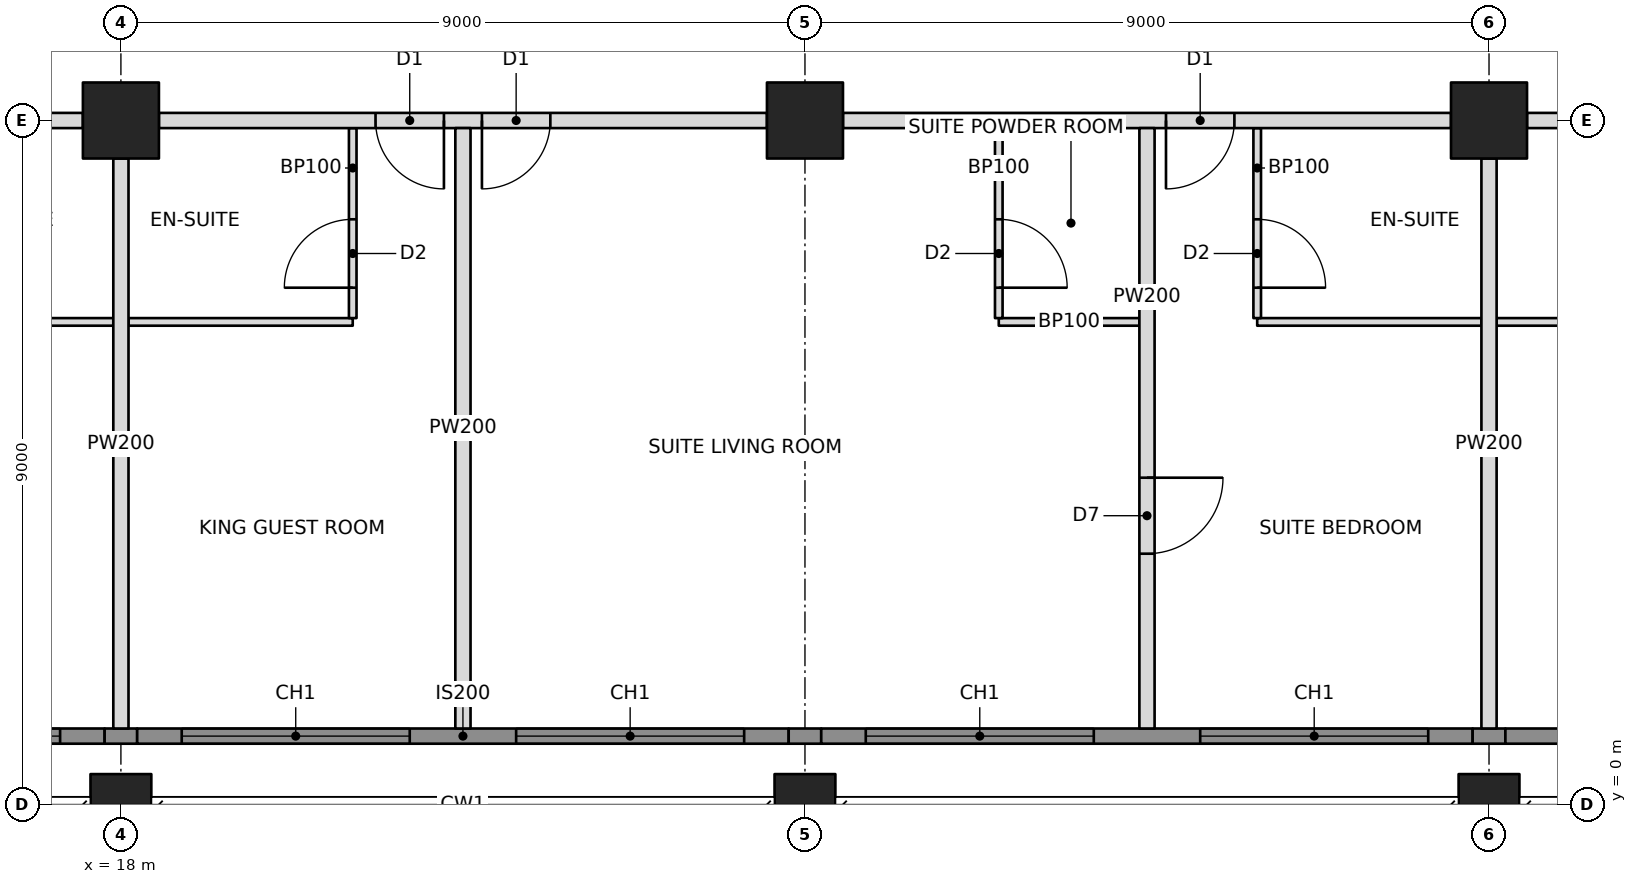
"""IFC4 building model, lengths in metres.
Left out: names, types, materials, properties, quantities, classifications, styles, units other than length and angle.
Written with IfcOpenShell. Run it as: python <this file> out.ifc"""

import sys

from ifc_helpers import new_model, si_unit, direction, frame, frame_2d, origin, origin_2d, place, context, subcontext, project, spatial, rectangle, hollow_rectangle, extrude, element, fill, save


model = new_model("IFC4")
c1 = context("Model", 3, precision=1e-05, world=origin(), true_north=direction((0.0, 1.0)))
c2 = subcontext(c1, "Body", "Model", "MODEL_VIEW")
j1 = project(units=[si_unit("LENGTHUNIT", "METRE"), si_unit("PLANEANGLEUNIT", "RADIAN")], contexts=[c1])
p1 = place(None, origin())
s1 = spatial("IfcSite", under=j1, at=p1, CompositionType="ELEMENT")
p2 = place(p1, origin())
s2 = spatial("IfcBuilding", under=s1, at=p2, CompositionType="ELEMENT")
p3 = place(p2, frame((0.0, 0.0, 152.0)))
s3 = spatial("IfcBuildingStorey", under=s2, at=p3, CompositionType="ELEMENT", Elevation=152.0)
p4 = place(p3, frame((18.0, 0.0, 0.0), z_axis=(0.0, 0.0, 1.0), x_axis=(1.0, 0.0, 0.0)))
e1 = element("IfcColumn", 1, at=p4, inside=s3, PredefinedType="COLUMN", context=c2, shape_type="SweptSolid", body=[
    extrude(hollow_rectangle(XDim=0.8, YDim=0.8, WallThickness=0.06, at=origin_2d()), origin(), (0.0, 0.0, 1.0), 3.4),
])
p5 = place(p3, frame((18.0, 9.0, 0.0), z_axis=(0.0, 0.0, 1.0), x_axis=(1.0, 0.0, 0.0)))
e2 = element("IfcColumn", 2, at=p5, inside=s3, PredefinedType="COLUMN", context=c2, shape_type="SweptSolid", body=[
    extrude(hollow_rectangle(XDim=1.0, YDim=1.0, WallThickness=0.1, at=origin_2d()), origin(), (0.0, 0.0, 1.0), 3.4),
])
p6 = place(p3, frame((27.0, 0.0, 0.0), z_axis=(0.0, 0.0, 1.0), x_axis=(1.0, 0.0, 0.0)))
e3 = element("IfcColumn", 3, at=p6, inside=s3, PredefinedType="COLUMN", context=c2, shape_type="SweptSolid", body=[
    extrude(hollow_rectangle(XDim=0.8, YDim=0.8, WallThickness=0.06, at=origin_2d()), origin(), (0.0, 0.0, 1.0), 3.4),
])
p7 = place(p3, frame((27.0, 9.0, 0.0), z_axis=(0.0, 0.0, 1.0), x_axis=(1.0, 0.0, 0.0)))
e4 = element("IfcColumn", 4, at=p7, inside=s3, PredefinedType="COLUMN", context=c2, shape_type="SweptSolid", body=[
    extrude(hollow_rectangle(XDim=1.0, YDim=1.0, WallThickness=0.1, at=origin_2d()), origin(), (0.0, 0.0, 1.0), 3.4),
])
p8 = place(p3, frame((36.0, 0.0, 0.0), z_axis=(0.0, 0.0, 1.0), x_axis=(1.0, 0.0, 0.0)))
e5 = element("IfcColumn", 5, at=p8, inside=s3, PredefinedType="COLUMN", context=c2, shape_type="SweptSolid", body=[
    extrude(hollow_rectangle(XDim=0.8, YDim=0.8, WallThickness=0.06, at=origin_2d()), origin(), (0.0, 0.0, 1.0), 3.4),
])
p9 = place(p3, frame((36.0, 9.0, 0.0), z_axis=(0.0, 0.0, 1.0), x_axis=(0.0, 1.0, 0.0)))
e6 = element("IfcColumn", 6, at=p9, inside=s3, PredefinedType="COLUMN", context=c2, shape_type="SweptSolid", body=[
    extrude(hollow_rectangle(XDim=1.0, YDim=1.0, WallThickness=0.1, at=origin_2d()), origin(), (0.0, 0.0, 1.0), 3.4),
])
p10 = place(p3, frame((9.5, 9.0, 0.0), z_axis=(0.0, 0.0, 1.0), x_axis=(1.0, 0.0, 0.0)))
e7 = element("IfcWall", 7, at=p10, inside=s3, PredefinedType="PARTITIONING", context=c2, shape_type="SweptSolid", body=[
    extrude(rectangle(XDim=8.0, YDim=0.2, at=frame_2d((4.0, 0.0))), origin(), (0.0, 0.0, 1.0), 2.21),
])
p11 = place(p10, frame((0.15, 0.0, 0.0)))
e8 = element("IfcOpeningElement", 8, at=p11, cuts=e7, PredefinedType="OPENING", context=c2, shape_type="SweptSolid", body=[
    extrude(rectangle(XDim=0.9, YDim=2.1, at=frame_2d((0.45, 1.05))), frame((0.0, 0.11, 0.0), z_axis=(0.0, -1.0, 0.0), x_axis=(1.0, 0.0, 0.0)), (0.0, 0.0, 1.0), 0.22),
])
p12 = place(p3, frame((18.5, 9.0, 0.0), z_axis=(0.0, 0.0, 1.0), x_axis=(1.0, 0.0, 0.0)))
e9 = element("IfcWall", 9, at=p12, inside=s3, PredefinedType="PARTITIONING", context=c2, shape_type="SweptSolid", body=[
    extrude(rectangle(XDim=8.0, YDim=0.2, at=frame_2d((4.0, 0.0))), origin(), (0.0, 0.0, 1.0), 2.21),
])
p13 = place(p12, frame((2.85, 0.0, 0.0)))
e10 = element("IfcOpeningElement", 10, at=p13, cuts=e9, PredefinedType="OPENING", context=c2, shape_type="SweptSolid", body=[
    extrude(rectangle(XDim=0.9, YDim=2.1, at=frame_2d((0.45, 1.05))), frame((0.0, 0.11, 0.0), z_axis=(0.0, -1.0, 0.0), x_axis=(1.0, 0.0, 0.0)), (0.0, 0.0, 1.0), 0.22),
])
p14 = place(p12, frame((4.25, 0.0, 0.0)))
e11 = element("IfcOpeningElement", 11, at=p14, cuts=e9, PredefinedType="OPENING", context=c2, shape_type="SweptSolid", body=[
    extrude(rectangle(XDim=0.9, YDim=2.1, at=frame_2d((0.45, 1.05))), frame((0.0, 0.11, 0.0), z_axis=(0.0, -1.0, 0.0), x_axis=(1.0, 0.0, 0.0)), (0.0, 0.0, 1.0), 0.22),
])
p15 = place(p3, frame((27.5, 9.0, 0.0), z_axis=(0.0, 0.0, 1.0), x_axis=(1.0, 0.0, 0.0)))
e12 = element("IfcWall", 12, at=p15, inside=s3, PredefinedType="PARTITIONING", context=c2, shape_type="SweptSolid", body=[
    extrude(rectangle(XDim=8.0, YDim=0.2, at=frame_2d((4.0, 0.0))), origin(), (0.0, 0.0, 1.0), 2.21),
])
p16 = place(p15, frame((4.25, 0.0, 0.0)))
e13 = element("IfcOpeningElement", 13, at=p16, cuts=e12, PredefinedType="OPENING", context=c2, shape_type="SweptSolid", body=[
    extrude(rectangle(XDim=0.9, YDim=2.1, at=frame_2d((0.45, 1.05))), frame((0.0, 0.11, 0.0), z_axis=(0.0, -1.0, 0.0), x_axis=(1.0, 0.0, 0.0)), (0.0, 0.0, 1.0), 0.22),
])
p17 = place(p3, frame((36.5, 9.0, 0.0), z_axis=(0.0, 0.0, 1.0), x_axis=(1.0, 0.0, 0.0)))
e14 = element("IfcWall", 14, at=p17, inside=s3, PredefinedType="PARTITIONING", context=c2, shape_type="SweptSolid", body=[
    extrude(rectangle(XDim=7.5, YDim=0.2, at=frame_2d((3.75, 0.0))), origin(), (0.0, 0.0, 1.0), 2.21),
])
p18 = place(p17, frame((6.35, 0.0, 0.0)))
e15 = element("IfcOpeningElement", 15, at=p18, cuts=e14, PredefinedType="OPENING", context=c2, shape_type="SweptSolid", body=[
    extrude(rectangle(XDim=0.9, YDim=2.1, at=frame_2d((0.45, 1.05))), frame((0.0, 0.11, 0.0), z_axis=(0.0, -1.0, 0.0), x_axis=(1.0, 0.0, 0.0)), (0.0, 0.0, 1.0), 0.22),
])
p19 = place(p3, frame((18.0, 8.5, 0.0), z_axis=(0.0, 0.0, 1.0), x_axis=(0.0, -1.0, 0.0)))
e16 = element("IfcWall", 16, at=p19, inside=s3, PredefinedType="PARTITIONING", context=c2, shape_type="SweptSolid", body=[
    extrude(rectangle(XDim=7.5, YDim=0.2, at=frame_2d((3.75, 0.0))), origin(), (0.0, 0.0, 1.0), 2.203),
])
p20 = place(p3, frame((22.5, 8.9, 0.0), z_axis=(0.0, 0.0, 1.0), x_axis=(0.0, -1.0, 0.0)))
e17 = element("IfcWall", 17, at=p20, inside=s3, PredefinedType="PARTITIONING", context=c2, shape_type="SweptSolid", body=[
    extrude(rectangle(XDim=7.9, YDim=0.2, at=frame_2d((3.95, 0.0))), origin(), (0.0, 0.0, 1.0), 2.21),
])
p21 = place(p3, frame((31.5, 8.9, 0.0), z_axis=(0.0, 0.0, 1.0), x_axis=(0.0, -1.0, 0.0)))
e18 = element("IfcWall", 18, at=p21, inside=s3, PredefinedType="PARTITIONING", context=c2, shape_type="SweptSolid", body=[
    extrude(rectangle(XDim=7.9, YDim=0.2, at=frame_2d((3.95, 0.0))), origin(), (0.0, 0.0, 1.0), 2.21),
])
p22 = place(p21, frame((4.6, 0.0, 0.0)))
e19 = element("IfcOpeningElement", 19, at=p22, cuts=e18, PredefinedType="OPENING", context=c2, shape_type="SweptSolid", body=[
    extrude(rectangle(XDim=1.0, YDim=2.1, at=frame_2d((0.5, 1.05))), frame((0.0, 0.11, 0.0), z_axis=(0.0, -1.0, 0.0), x_axis=(1.0, 0.0, 0.0)), (0.0, 0.0, 1.0), 0.22),
])
p23 = place(p3, frame((36.0, 8.5, 0.0), z_axis=(0.0, 0.0, 1.0), x_axis=(0.0, -1.0, 0.0)))
e20 = element("IfcWall", 20, at=p23, inside=s3, PredefinedType="PARTITIONING", context=c2, shape_type="SweptSolid", body=[
    extrude(rectangle(XDim=7.5, YDim=0.2, at=frame_2d((3.75, 0.0))), origin(), (0.0, 0.0, 1.0), 2.21),
])
p24 = place(p3, frame((14.45, 6.35, 0.0), z_axis=(0.0, 0.0, 1.0), x_axis=(1.0, 0.0, 0.0)))
e21 = element("IfcWall", 21, at=p24, inside=s3, PredefinedType="PARTITIONING", context=c2, shape_type="SweptSolid", body=[
    extrude(rectangle(XDim=3.45, YDim=0.1, at=frame_2d((1.725, 0.0))), origin(), (0.0, 0.0, 1.0), 2.202),
])
p25 = place(p3, frame((18.1, 6.35, 0.0), z_axis=(0.0, 0.0, 1.0), x_axis=(1.0, 0.0, 0.0)))
e22 = element("IfcWall", 22, at=p25, inside=s3, PredefinedType="PARTITIONING", context=c2, shape_type="SweptSolid", body=[
    extrude(rectangle(XDim=2.95, YDim=0.1, at=frame_2d((1.475, 0.0))), origin(), (0.0, 0.0, 1.0), 2.202),
])
p26 = place(p3, frame((21.05, 8.9, 0.0), z_axis=(0.0, 0.0, 1.0), x_axis=(0.0, -1.0, 0.0)))
e23 = element("IfcWall", 23, at=p26, inside=s3, PredefinedType="PARTITIONING", context=c2, shape_type="SweptSolid", body=[
    extrude(rectangle(XDim=2.5, YDim=0.1, at=frame_2d((1.25, 0.0))), origin(), (0.0, 0.0, 1.0), 2.21),
])
p27 = place(p26, frame((1.2, 0.0, 0.0)))
e24 = element("IfcOpeningElement", 24, at=p27, cuts=e23, PredefinedType="OPENING", context=c2, shape_type="SweptSolid", body=[
    extrude(rectangle(XDim=0.9, YDim=2.1, at=frame_2d((0.45, 1.05))), frame((0.0, 0.06, 0.0), z_axis=(0.0, -1.0, 0.0), x_axis=(1.0, 0.0, 0.0)), (0.0, 0.0, 1.0), 0.12),
])
p28 = place(p3, frame((29.55, 6.35, 0.0), z_axis=(0.0, 0.0, 1.0), x_axis=(1.0, 0.0, 0.0)))
e25 = element("IfcWall", 25, at=p28, inside=s3, PredefinedType="PARTITIONING", context=c2, shape_type="SweptSolid", body=[
    extrude(rectangle(XDim=1.85, YDim=0.1, at=frame_2d((0.925, 0.0))), origin(), (0.0, 0.0, 1.0), 3.15),
])
p29 = place(p3, frame((29.55, 8.9, 0.0), z_axis=(0.0, 0.0, 1.0), x_axis=(0.0, -1.0, 0.0)))
e26 = element("IfcWall", 26, at=p29, inside=s3, PredefinedType="PARTITIONING", context=c2, shape_type="SweptSolid", body=[
    extrude(rectangle(XDim=2.5, YDim=0.1, at=frame_2d((1.25, 0.0))), origin(), (0.0, 0.0, 1.0), 2.21),
])
p30 = place(p29, frame((1.2, 0.0, 0.0)))
e27 = element("IfcOpeningElement", 27, at=p30, cuts=e26, PredefinedType="OPENING", context=c2, shape_type="SweptSolid", body=[
    extrude(rectangle(XDim=0.9, YDim=2.1, at=frame_2d((0.45, 1.05))), frame((0.0, 0.06, 0.0), z_axis=(0.0, -1.0, 0.0), x_axis=(1.0, 0.0, 0.0)), (0.0, 0.0, 1.0), 0.12),
])
p31 = place(p3, frame((32.95, 6.35, 0.0), z_axis=(0.0, 0.0, 1.0), x_axis=(1.0, 0.0, 0.0)))
e28 = element("IfcWall", 28, at=p31, inside=s3, PredefinedType="PARTITIONING", context=c2, shape_type="SweptSolid", body=[
    extrude(rectangle(XDim=2.95, YDim=0.1, at=frame_2d((1.475, 0.0))), origin(), (0.0, 0.0, 1.0), 2.21),
])
p32 = place(p3, frame((32.95, 8.9, 0.0), z_axis=(0.0, 0.0, 1.0), x_axis=(0.0, -1.0, 0.0)))
e29 = element("IfcWall", 29, at=p32, inside=s3, PredefinedType="PARTITIONING", context=c2, shape_type="SweptSolid", body=[
    extrude(rectangle(XDim=2.5, YDim=0.1, at=frame_2d((1.25, 0.0))), origin(), (0.0, 0.0, 1.0), 2.21),
])
p33 = place(p32, frame((1.2, 0.0, 0.0)))
e30 = element("IfcOpeningElement", 30, at=p33, cuts=e29, PredefinedType="OPENING", context=c2, shape_type="SweptSolid", body=[
    extrude(rectangle(XDim=0.9, YDim=2.1, at=frame_2d((0.45, 1.05))), frame((0.0, 0.06, 0.0), z_axis=(0.0, -1.0, 0.0), x_axis=(1.0, 0.0, 0.0)), (0.0, 0.0, 1.0), 0.12),
])
p34 = place(p3, frame((36.1, 6.35, 0.0), z_axis=(0.0, 0.0, 1.0), x_axis=(1.0, 0.0, 0.0)))
e31 = element("IfcWall", 31, at=p34, inside=s3, PredefinedType="PARTITIONING", context=c2, shape_type="SweptSolid", body=[
    extrude(rectangle(XDim=3.45, YDim=0.1, at=frame_2d((1.725, 0.0))), origin(), (0.0, 0.0, 1.0), 2.21),
])
p35 = place(p3, frame((9.215, 0.9, 0.0), z_axis=(0.0, 0.0, 1.0), x_axis=(1.0, 0.0, 0.0)))
e32 = element("IfcWall", 32, at=p35, inside=s3, PredefinedType="SOLIDWALL", context=c2, shape_type="SweptSolid", body=[
    extrude(rectangle(XDim=8.571, YDim=0.2, at=frame_2d((4.285, 0.0))), origin(), (0.0, 0.0, 1.0), 3.15),
])
p36 = place(p35, frame((0.585, 0.0, 0.6)))
e33 = element("IfcOpeningElement", 33, at=p36, cuts=e32, PredefinedType="OPENING", context=c2, shape_type="SweptSolid", body=[
    extrude(rectangle(XDim=3.0, YDim=2.2, at=frame_2d((1.5, 1.1))), frame((0.0, 0.11, 0.0), z_axis=(0.0, -1.0, 0.0), x_axis=(1.0, 0.0, 0.0)), (0.0, 0.0, 1.0), 0.22),
])
p37 = place(p35, frame((4.985, 0.0, 0.6)))
e34 = element("IfcOpeningElement", 34, at=p37, cuts=e32, PredefinedType="OPENING", context=c2, shape_type="SweptSolid", body=[
    extrude(rectangle(XDim=3.0, YDim=2.2, at=frame_2d((1.5, 1.1))), frame((0.0, 0.11, 0.0), z_axis=(0.0, -1.0, 0.0), x_axis=(1.0, 0.0, 0.0)), (0.0, 0.0, 1.0), 0.22),
])
p38 = place(p3, frame((17.786, 0.9, 0.0), z_axis=(0.0, 0.0, 1.0), x_axis=(1.0, 0.0, 0.0)))
e35 = element("IfcWall", 35, at=p38, inside=s3, PredefinedType="SOLIDWALL", context=c2, shape_type="SweptSolid", body=[
    extrude(rectangle(XDim=0.428, YDim=0.2, at=frame_2d((0.214, 0.0))), origin(), (0.0, 0.0, 1.0), 2.202),
])
p39 = place(p3, frame((18.214, 0.9, 0.0), z_axis=(0.0, 0.0, 1.0), x_axis=(1.0, 0.0, 0.0)))
e36 = element("IfcWall", 36, at=p39, inside=s3, PredefinedType="SOLIDWALL", context=c2, shape_type="SweptSolid", body=[
    extrude(rectangle(XDim=8.572, YDim=0.2, at=frame_2d((4.286, 0.0))), origin(), (0.0, 0.0, 1.0), 3.15),
])
p40 = place(p39, frame((0.586, 0.0, 0.6)))
e37 = element("IfcOpeningElement", 37, at=p40, cuts=e36, PredefinedType="OPENING", context=c2, shape_type="SweptSolid", body=[
    extrude(rectangle(XDim=3.0, YDim=2.2, at=frame_2d((1.5, 1.1))), frame((0.0, 0.11, 0.0), z_axis=(0.0, -1.0, 0.0), x_axis=(1.0, 0.0, 0.0)), (0.0, 0.0, 1.0), 0.22),
])
p41 = place(p39, frame((4.986, 0.0, 0.6)))
e38 = element("IfcOpeningElement", 38, at=p41, cuts=e36, PredefinedType="OPENING", context=c2, shape_type="SweptSolid", body=[
    extrude(rectangle(XDim=3.0, YDim=2.2, at=frame_2d((1.5, 1.1))), frame((0.0, 0.11, 0.0), z_axis=(0.0, -1.0, 0.0), x_axis=(1.0, 0.0, 0.0)), (0.0, 0.0, 1.0), 0.22),
])
p42 = place(p3, frame((26.786, 0.9, 0.0), z_axis=(0.0, 0.0, 1.0), x_axis=(1.0, 0.0, 0.0)))
e39 = element("IfcWall", 39, at=p42, inside=s3, PredefinedType="SOLIDWALL", context=c2, shape_type="SweptSolid", body=[
    extrude(rectangle(XDim=0.428, YDim=0.2, at=frame_2d((0.214, 0.0))), origin(), (0.0, 0.0, 1.0), 2.202),
])
p43 = place(p3, frame((27.214, 0.9, 0.0), z_axis=(0.0, 0.0, 1.0), x_axis=(1.0, 0.0, 0.0)))
e40 = element("IfcWall", 40, at=p43, inside=s3, PredefinedType="SOLIDWALL", context=c2, shape_type="SweptSolid", body=[
    extrude(rectangle(XDim=8.571, YDim=0.2, at=frame_2d((4.285, 0.0))), origin(), (0.0, 0.0, 1.0), 3.15),
])
p44 = place(p43, frame((0.586, 0.0, 0.6)))
e41 = element("IfcOpeningElement", 41, at=p44, cuts=e40, PredefinedType="OPENING", context=c2, shape_type="SweptSolid", body=[
    extrude(rectangle(XDim=3.0, YDim=2.2, at=frame_2d((1.5, 1.1))), frame((0.0, 0.11, 0.0), z_axis=(0.0, -1.0, 0.0), x_axis=(1.0, 0.0, 0.0)), (0.0, 0.0, 1.0), 0.22),
])
p45 = place(p43, frame((4.986, 0.0, 0.6)))
e42 = element("IfcOpeningElement", 42, at=p45, cuts=e40, PredefinedType="OPENING", context=c2, shape_type="SweptSolid", body=[
    extrude(rectangle(XDim=3.0, YDim=2.2, at=frame_2d((1.5, 1.1))), frame((0.0, 0.11, 0.0), z_axis=(0.0, -1.0, 0.0), x_axis=(1.0, 0.0, 0.0)), (0.0, 0.0, 1.0), 0.22),
])
p46 = place(p3, frame((35.785, 0.9, 0.0), z_axis=(0.0, 0.0, 1.0), x_axis=(1.0, 0.0, 0.0)))
e43 = element("IfcWall", 43, at=p46, inside=s3, PredefinedType="SOLIDWALL", context=c2, shape_type="SweptSolid", body=[
    extrude(rectangle(XDim=0.431, YDim=0.2, at=frame_2d((0.215, 0.0))), origin(), (0.0, 0.0, 1.0), 2.21),
])
p47 = place(p3, frame((36.215, 0.9, 0.0), z_axis=(0.0, 0.0, 1.0), x_axis=(1.0, 0.0, 0.0)))
e44 = element("IfcWall", 44, at=p47, inside=s3, PredefinedType="SOLIDWALL", context=c2, shape_type="SweptSolid", body=[
    extrude(rectangle(XDim=5.785, YDim=0.2, at=frame_2d((2.892, 0.0))), origin(), (0.0, 0.0, 1.0), 3.15),
])
p48 = place(p47, frame((1.335, 0.0, 0.6)))
e45 = element("IfcOpeningElement", 45, at=p48, cuts=e44, PredefinedType="OPENING", context=c2, shape_type="SweptSolid", body=[
    extrude(rectangle(XDim=3.0, YDim=2.2, at=frame_2d((1.5, 1.1))), frame((0.0, 0.11, 0.0), z_axis=(0.0, -1.0, 0.0), x_axis=(1.0, 0.0, 0.0)), (0.0, 0.0, 1.0), 0.22),
])
p49 = place(p37, origin())
e46 = element("IfcWindow", 46, at=p49, inside=s3, PartitioningType="TRIPLE_PANEL_VERTICAL", PredefinedType="WINDOW", context=c2, shape_type="SweptSolid", body=[
    extrude(rectangle(XDim=3.0, YDim=2.2, at=frame_2d((1.5, 1.1))), frame((0.0, 0.03, 0.0), z_axis=(0.0, -1.0, 0.0), x_axis=(1.0, 0.0, 0.0)), (0.0, 0.0, 1.0), 0.06),
])
fill(e34, e46)
p50 = place(p40, origin())
e47 = element("IfcWindow", 47, at=p50, inside=s3, PartitioningType="TRIPLE_PANEL_VERTICAL", PredefinedType="WINDOW", context=c2, shape_type="SweptSolid", body=[
    extrude(rectangle(XDim=3.0, YDim=2.2, at=frame_2d((1.5, 1.1))), frame((0.0, 0.03, 0.0), z_axis=(0.0, -1.0, 0.0), x_axis=(1.0, 0.0, 0.0)), (0.0, 0.0, 1.0), 0.06),
])
fill(e37, e47)
p51 = place(p41, origin())
e48 = element("IfcWindow", 48, at=p51, inside=s3, PartitioningType="TRIPLE_PANEL_VERTICAL", PredefinedType="WINDOW", context=c2, shape_type="SweptSolid", body=[
    extrude(rectangle(XDim=3.0, YDim=2.2, at=frame_2d((1.5, 1.1))), frame((0.0, 0.03, 0.0), z_axis=(0.0, -1.0, 0.0), x_axis=(1.0, 0.0, 0.0)), (0.0, 0.0, 1.0), 0.06),
])
fill(e38, e48)
p52 = place(p44, origin())
e49 = element("IfcWindow", 49, at=p52, inside=s3, PartitioningType="TRIPLE_PANEL_VERTICAL", PredefinedType="WINDOW", context=c2, shape_type="SweptSolid", body=[
    extrude(rectangle(XDim=3.0, YDim=2.2, at=frame_2d((1.5, 1.1))), frame((0.0, 0.03, 0.0), z_axis=(0.0, -1.0, 0.0), x_axis=(1.0, 0.0, 0.0)), (0.0, 0.0, 1.0), 0.06),
])
fill(e41, e49)
p53 = place(p45, origin())
e50 = element("IfcWindow", 50, at=p53, inside=s3, PartitioningType="TRIPLE_PANEL_VERTICAL", PredefinedType="WINDOW", context=c2, shape_type="SweptSolid", body=[
    extrude(rectangle(XDim=3.0, YDim=2.2, at=frame_2d((1.5, 1.1))), frame((0.0, 0.03, 0.0), z_axis=(0.0, -1.0, 0.0), x_axis=(1.0, 0.0, 0.0)), (0.0, 0.0, 1.0), 0.06),
])
fill(e42, e50)
p54 = place(p22, origin())
e51 = element("IfcDoor", 51, at=p54, inside=s3, OperationType="SINGLE_SWING_LEFT", PredefinedType="DOOR", context=c2, shape_type="SweptSolid", body=[
    extrude(rectangle(XDim=1.0, YDim=2.1, at=frame_2d((0.5, 1.05))), frame((0.0, 0.025, 0.0), z_axis=(0.0, -1.0, 0.0), x_axis=(1.0, 0.0, 0.0)), (0.0, 0.0, 1.0), 0.05),
])
fill(e19, e51)
p55 = place(p27, frame((0.9, 0.0, 0.0), z_axis=(0.0, 0.0, 1.0), x_axis=(-1.0, 0.0, 0.0)))
e52 = element("IfcDoor", 52, at=p55, inside=s3, OperationType="SINGLE_SWING_LEFT", PredefinedType="DOOR", context=c2, shape_type="SweptSolid", body=[
    extrude(rectangle(XDim=0.9, YDim=2.1, at=frame_2d((0.45, 1.05))), frame((0.0, 0.025, 0.0), z_axis=(0.0, -1.0, 0.0), x_axis=(1.0, 0.0, 0.0)), (0.0, 0.0, 1.0), 0.05),
])
fill(e24, e52)
p56 = place(p13, frame((0.9, 0.0, 0.0), z_axis=(0.0, 0.0, 1.0), x_axis=(-1.0, 0.0, 0.0)))
e53 = element("IfcDoor", 53, at=p56, inside=s3, OperationType="SINGLE_SWING_LEFT", PredefinedType="DOOR", context=c2, shape_type="SweptSolid", body=[
    extrude(rectangle(XDim=0.9, YDim=2.1, at=frame_2d((0.45, 1.05))), frame((0.0, 0.025, 0.0), z_axis=(0.0, -1.0, 0.0), x_axis=(1.0, 0.0, 0.0)), (0.0, 0.0, 1.0), 0.05),
])
fill(e10, e53)
p57 = place(p30, origin())
e54 = element("IfcDoor", 54, at=p57, inside=s3, OperationType="SINGLE_SWING_RIGHT", PredefinedType="DOOR", context=c2, shape_type="SweptSolid", body=[
    extrude(rectangle(XDim=0.9, YDim=2.1, at=frame_2d((0.45, 1.05))), frame((0.0, 0.025, 0.0), z_axis=(0.0, -1.0, 0.0), x_axis=(1.0, 0.0, 0.0)), (0.0, 0.0, 1.0), 0.05),
])
fill(e27, e54)
p58 = place(p14, frame((0.9, 0.0, 0.0), z_axis=(0.0, 0.0, 1.0), x_axis=(-1.0, 0.0, 0.0)))
e55 = element("IfcDoor", 55, at=p58, inside=s3, OperationType="SINGLE_SWING_RIGHT", PredefinedType="DOOR", context=c2, shape_type="SweptSolid", body=[
    extrude(rectangle(XDim=0.9, YDim=2.1, at=frame_2d((0.45, 1.05))), frame((0.0, 0.025, 0.0), z_axis=(0.0, -1.0, 0.0), x_axis=(1.0, 0.0, 0.0)), (0.0, 0.0, 1.0), 0.05),
])
fill(e11, e55)
p59 = place(p33, origin())
e56 = element("IfcDoor", 56, at=p59, inside=s3, OperationType="SINGLE_SWING_RIGHT", PredefinedType="DOOR", context=c2, shape_type="SweptSolid", body=[
    extrude(rectangle(XDim=0.9, YDim=2.1, at=frame_2d((0.45, 1.05))), frame((0.0, 0.025, 0.0), z_axis=(0.0, -1.0, 0.0), x_axis=(1.0, 0.0, 0.0)), (0.0, 0.0, 1.0), 0.05),
])
fill(e30, e56)
p60 = place(p16, frame((0.9, 0.0, 0.0), z_axis=(0.0, 0.0, 1.0), x_axis=(-1.0, 0.0, 0.0)))
e57 = element("IfcDoor", 57, at=p60, inside=s3, OperationType="SINGLE_SWING_RIGHT", PredefinedType="DOOR", context=c2, shape_type="SweptSolid", body=[
    extrude(rectangle(XDim=0.9, YDim=2.1, at=frame_2d((0.45, 1.05))), frame((0.0, 0.025, 0.0), z_axis=(0.0, -1.0, 0.0), x_axis=(1.0, 0.0, 0.0)), (0.0, 0.0, 1.0), 0.05),
])
fill(e13, e57)
save(model, sys.argv[1])
